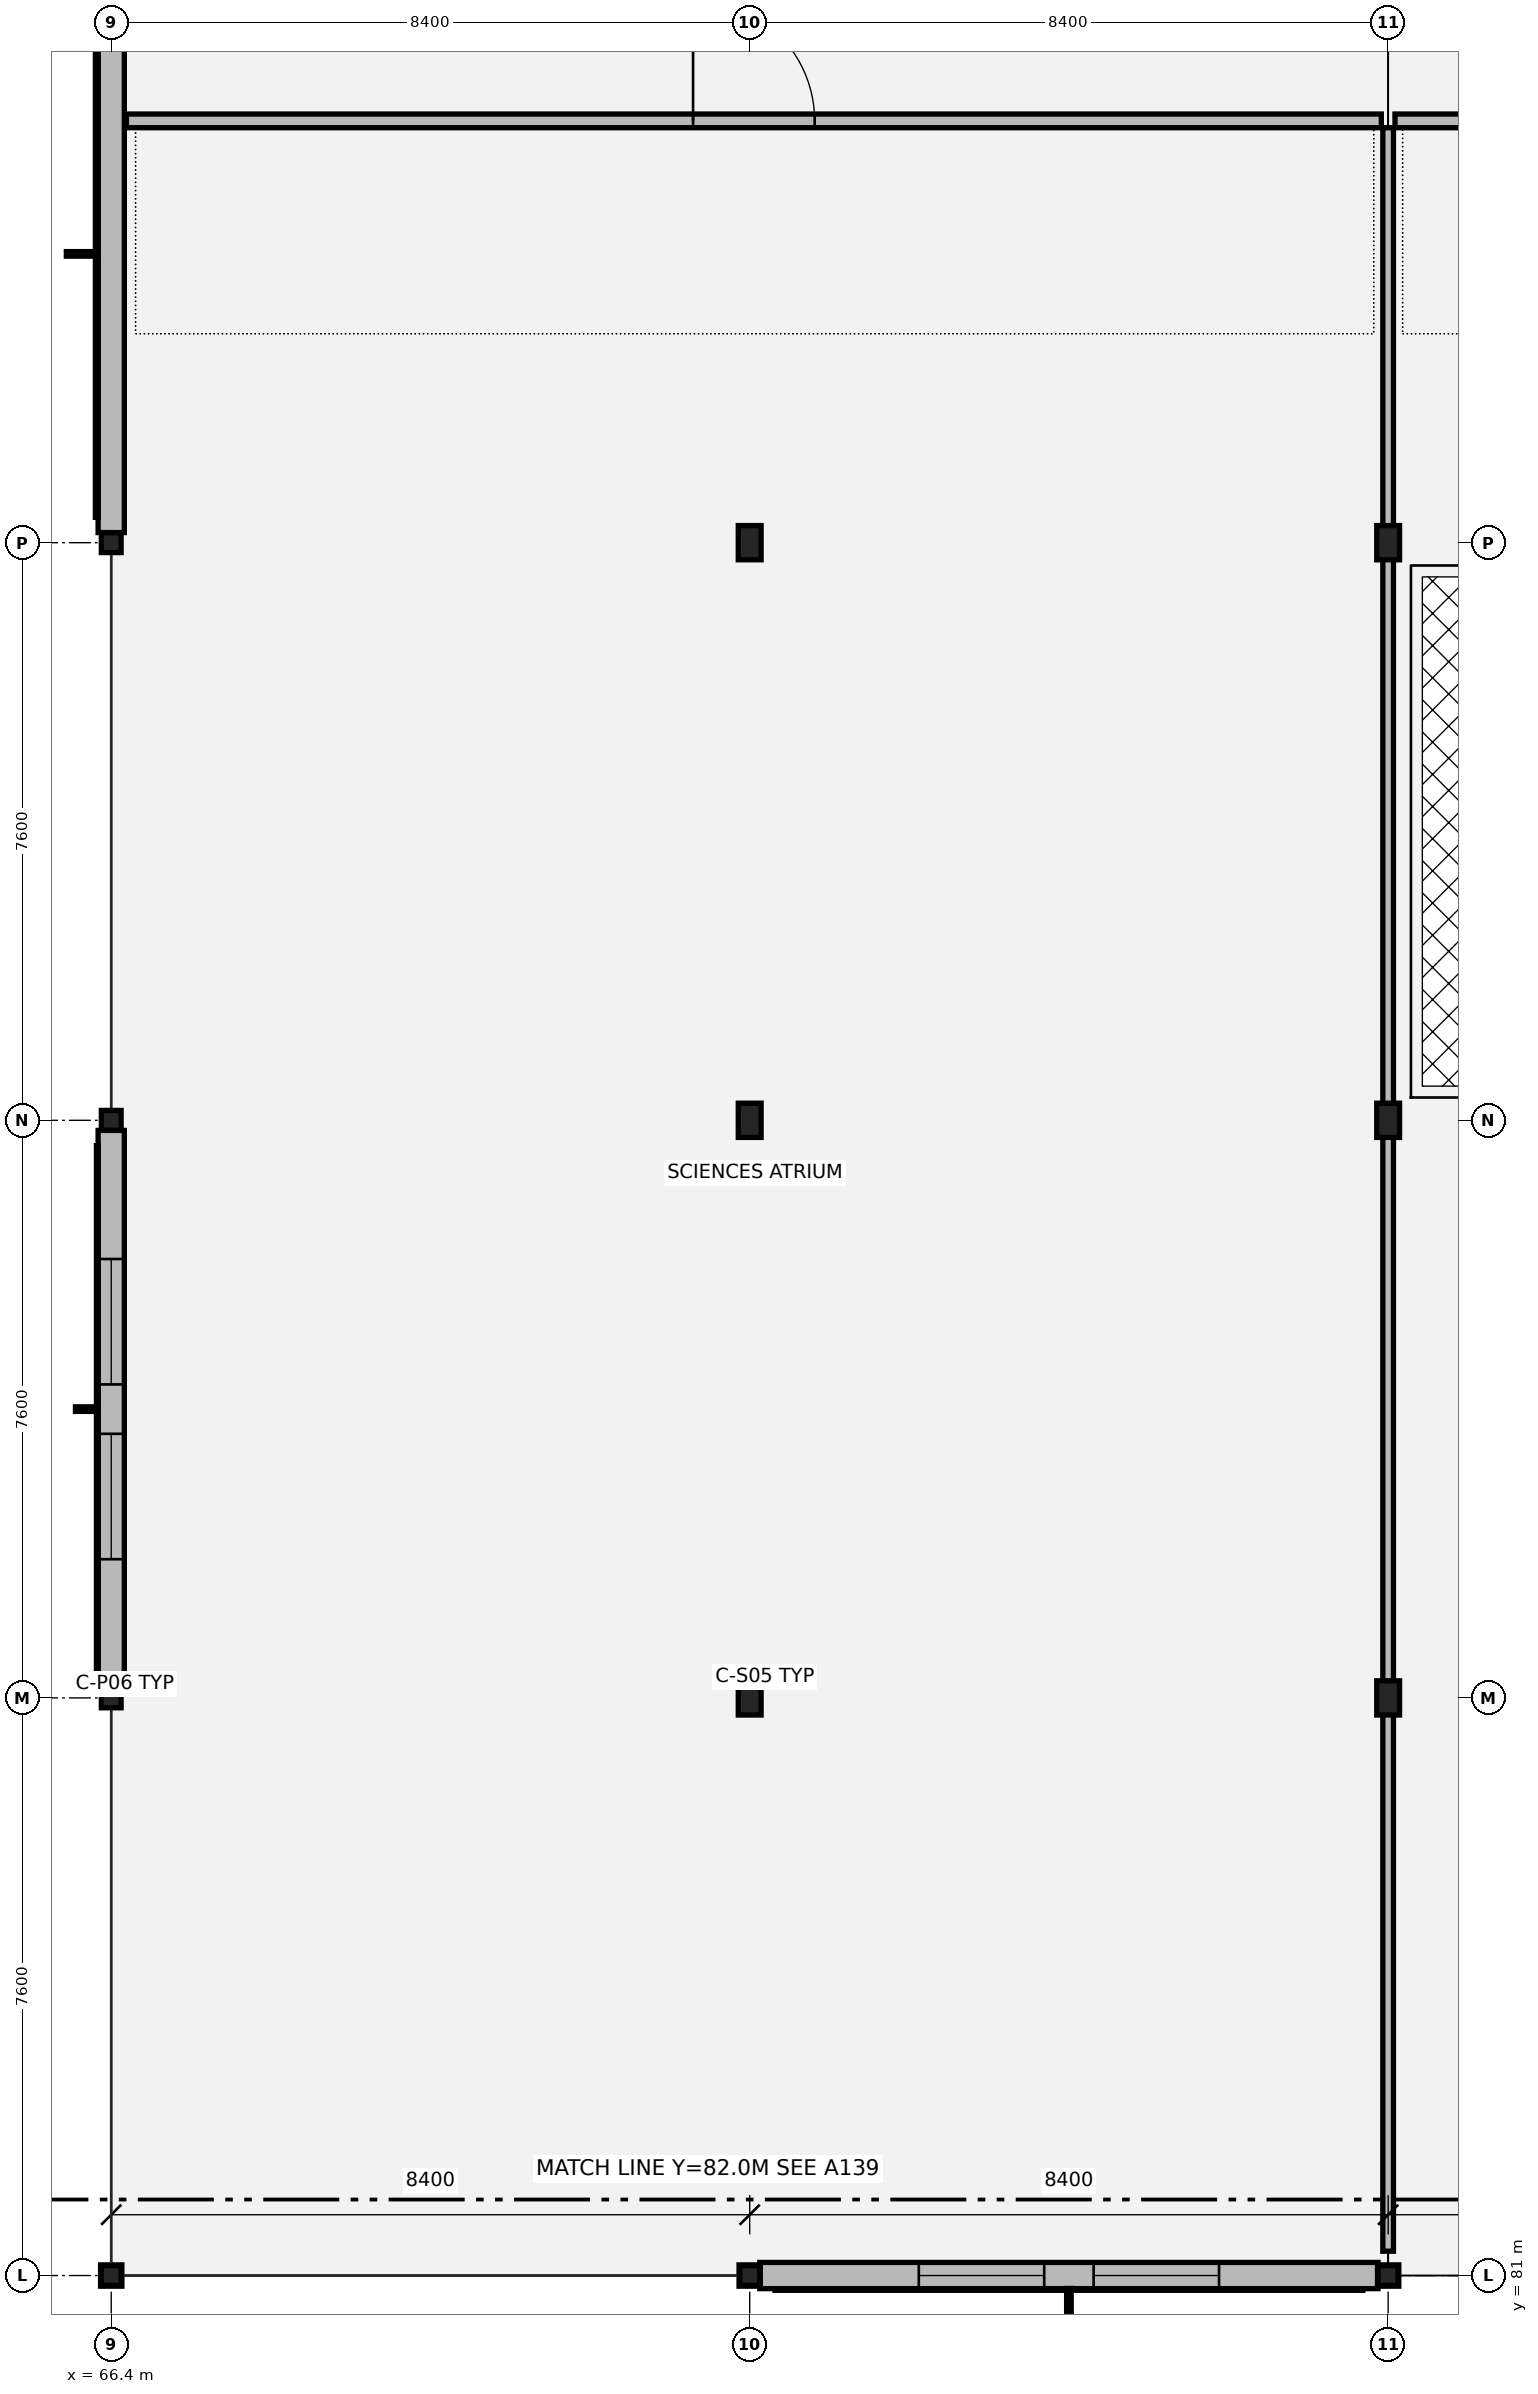
"""IFC4 building model, lengths in metres.
Left out: names, types, materials, properties, quantities, classifications, styles, units other than length and angle.
Written with IfcOpenShell. Run it as: python <this file> out.ifc"""

import sys

from ifc_helpers import new_model, si_unit, direction, frame, frame_2d, origin, origin_2d, place, context, subcontext, project, spatial, rectangle, hollow_rectangle, i_section, extrude, element, fill, save


model = new_model("IFC4")
c1 = context("Model", 3, precision=1e-05, world=origin(), true_north=direction((0.0, 1.0)))
c2 = subcontext(c1, "Body", "Model", "MODEL_VIEW")
j1 = project(units=[si_unit("LENGTHUNIT", "METRE"), si_unit("PLANEANGLEUNIT", "RADIAN")], contexts=[c1])
p1 = place(None, origin())
s1 = spatial("IfcSite", under=j1, at=p1, CompositionType="ELEMENT")
p2 = place(p1, origin())
s2 = spatial("IfcBuilding", under=s1, at=p2, CompositionType="ELEMENT")
p3 = place(p2, frame((0.0, 0.0, 9.18)))
s3 = spatial("IfcBuildingStorey", under=s2, at=p3, CompositionType="ELEMENT", Elevation=9.18)
p4 = place(p3, frame((66.4, 81.0, 0.0), z_axis=(0.0, 0.0, 1.0), x_axis=(1.0, 0.0, 0.0)))
e1 = element("IfcColumn", 1, at=p4, inside=s3, PredefinedType="COLUMN", context=c2, shape_type="SweptSolid", body=[
    extrude(hollow_rectangle(XDim=0.26, YDim=0.26, WallThickness=0.012, at=origin_2d()), origin(), (0.0, 0.0, 1.0), 3.875),
])
for number, where, z_axis, x_axis in (
    (2, (66.4, 88.6, 0.0), (0.0, 0.0, 1.0), (1.0, 0.0, 0.0)),
    (3, (66.4, 96.2, 0.0), (0.0, 0.0, 1.0), (1.0, 0.0, 0.0)),
    (4, (66.4, 103.8, 0.0), (0.0, 0.0, 1.0), (1.0, 0.0, 0.0)),
):
    element("IfcColumn", number, at=place(p3, frame(where, z_axis=z_axis, x_axis=x_axis)), inside=s3, PredefinedType="COLUMN", context=c2, shape_type="SweptSolid", body=[
        extrude(hollow_rectangle(XDim=0.26, YDim=0.26, WallThickness=0.012, at=origin_2d()), origin(), (0.0, 0.0, 1.0), 4.055),
    ])
p5 = place(p3, frame((74.8, 81.0, 0.0), z_axis=(0.0, 0.0, 1.0), x_axis=(1.0, 0.0, 0.0)))
e5 = element("IfcColumn", 5, at=p5, inside=s3, PredefinedType="COLUMN", context=c2, shape_type="SweptSolid", body=[
    extrude(hollow_rectangle(XDim=0.26, YDim=0.26, WallThickness=0.012, at=origin_2d()), origin(), (0.0, 0.0, 1.0), 3.875),
])
for number, where, z_axis, x_axis in (
    (6, (74.8, 88.6, 0.0), (0.0, 0.0, 1.0), (1.0, 0.0, 0.0)),
    (7, (74.8, 96.2, 0.0), (0.0, 0.0, 1.0), (1.0, 0.0, 0.0)),
    (8, (74.8, 103.8, 0.0), (0.0, 0.0, 1.0), (1.0, 0.0, 0.0)),
):
    element("IfcColumn", number, at=place(p3, frame(where, z_axis=z_axis, x_axis=x_axis)), inside=s3, PredefinedType="COLUMN", context=c2, shape_type="SweptSolid", body=[
        extrude(i_section(OverallWidth=0.3, OverallDepth=0.45, WebThickness=0.014, FlangeThickness=0.026, at=origin_2d()), origin(), (0.0, 0.0, 1.0), 4.055),
    ])
p6 = place(p3, frame((83.2, 81.0, 0.0), z_axis=(0.0, 0.0, 1.0), x_axis=(1.0, 0.0, 0.0)))
e9 = element("IfcColumn", 9, at=p6, inside=s3, PredefinedType="COLUMN", context=c2, shape_type="SweptSolid", body=[
    extrude(hollow_rectangle(XDim=0.26, YDim=0.26, WallThickness=0.012, at=origin_2d()), origin(), (0.0, 0.0, 1.0), 3.875),
])
for number, where, z_axis, x_axis in (
    (10, (83.2, 88.6, 0.0), (0.0, 0.0, 1.0), (1.0, 0.0, 0.0)),
    (11, (83.2, 96.2, 0.0), (0.0, 0.0, 1.0), (1.0, 0.0, 0.0)),
    (12, (83.2, 103.8, 0.0), (0.0, 0.0, 1.0), (1.0, 0.0, 0.0)),
):
    element("IfcColumn", number, at=place(p3, frame(where, z_axis=z_axis, x_axis=x_axis)), inside=s3, PredefinedType="COLUMN", context=c2, shape_type="SweptSolid", body=[
        extrude(i_section(OverallWidth=0.3, OverallDepth=0.45, WebThickness=0.014, FlangeThickness=0.026, at=origin_2d()), origin(), (0.0, 0.0, 1.0), 4.055),
    ])
p7 = place(p3, frame((74.933, 81.0, 0.0), z_axis=(0.0, 0.0, 1.0), x_axis=(1.0, 0.0, 0.0)))
e13 = element("IfcWall", 13, at=p7, inside=s3, PredefinedType="SOLIDWALL", context=c2, shape_type="SweptSolid", body=[
    extrude(rectangle(XDim=8.134, YDim=0.345, at=frame_2d((4.067, 0.0))), origin(), (0.0, 0.0, 1.0), 3.48),
])
p8 = place(p7, frame((2.092, 0.0, 0.8)))
e14 = element("IfcOpeningElement", 14, at=p8, cuts=e13, PredefinedType="OPENING", context=c2, shape_type="SweptSolid", body=[
    extrude(rectangle(XDim=1.65, YDim=2.25, at=frame_2d((0.825, 1.125))), frame((0.0, 0.182, 0.0), z_axis=(0.0, -1.0, 0.0), x_axis=(1.0, 0.0, 0.0)), (0.0, 0.0, 1.0), 0.365),
])
p9 = place(p7, frame((4.392, 0.0, 0.8)))
e15 = element("IfcOpeningElement", 15, at=p9, cuts=e13, PredefinedType="OPENING", context=c2, shape_type="SweptSolid", body=[
    extrude(rectangle(XDim=1.65, YDim=2.25, at=frame_2d((0.825, 1.125))), frame((0.0, 0.182, 0.0), z_axis=(0.0, -1.0, 0.0), x_axis=(1.0, 0.0, 0.0)), (0.0, 0.0, 1.0), 0.365),
])
p10 = place(p3, frame((66.4, 111.267, 0.0), z_axis=(0.0, 0.0, 1.0), x_axis=(0.0, -1.0, 0.0)))
e16 = element("IfcWall", 16, at=p10, inside=s3, PredefinedType="SOLIDWALL", context=c2, shape_type="SweptSolid", body=[
    extrude(rectangle(XDim=7.334, YDim=0.345, at=frame_2d((3.667, 0.0))), origin(), (0.0, 0.0, 1.0), 3.48),
])
p11 = place(p3, frame((66.4, 96.067, 0.0), z_axis=(0.0, 0.0, 1.0), x_axis=(0.0, -1.0, 0.0)))
e17 = element("IfcWall", 17, at=p11, inside=s3, PredefinedType="SOLIDWALL", context=c2, shape_type="SweptSolid", body=[
    extrude(rectangle(XDim=7.334, YDim=0.345, at=frame_2d((3.667, 0.0))), origin(), (0.0, 0.0, 1.0), 3.48),
])
p12 = place(p11, frame((1.692, 0.0, 0.8)))
e18 = element("IfcOpeningElement", 18, at=p12, cuts=e17, PredefinedType="OPENING", context=c2, shape_type="SweptSolid", body=[
    extrude(rectangle(XDim=1.65, YDim=2.25, at=frame_2d((0.825, 1.125))), frame((0.0, 0.182, 0.0), z_axis=(0.0, -1.0, 0.0), x_axis=(1.0, 0.0, 0.0)), (0.0, 0.0, 1.0), 0.365),
])
p13 = place(p11, frame((3.992, 0.0, 0.8)))
e19 = element("IfcOpeningElement", 19, at=p13, cuts=e17, PredefinedType="OPENING", context=c2, shape_type="SweptSolid", body=[
    extrude(rectangle(XDim=1.65, YDim=2.25, at=frame_2d((0.825, 1.125))), frame((0.0, 0.182, 0.0), z_axis=(0.0, -1.0, 0.0), x_axis=(1.0, 0.0, 0.0)), (0.0, 0.0, 1.0), 0.365),
])
p14 = place(p3, frame((66.6, 109.35, 0.0), z_axis=(0.0, 0.0, 1.0), x_axis=(1.0, 0.0, 0.0)))
e20 = element("IfcWall", 20, at=p14, inside=s3, PredefinedType="PARTITIONING", context=c2, shape_type="SweptSolid", body=[
    extrude(rectangle(XDim=16.51, YDim=0.18, at=frame_2d((8.255, 0.0))), origin(), (0.0, 0.0, 1.0), 3.18),
])
p15 = place(p14, frame((7.455, 0.0, 0.0)))
e21 = element("IfcOpeningElement", 21, at=p15, cuts=e20, PredefinedType="OPENING", context=c2, shape_type="SweptSolid", body=[
    extrude(rectangle(XDim=1.6, YDim=2.25, at=frame_2d((0.8, 1.125))), frame((0.0, 0.1, 0.0), z_axis=(0.0, -1.0, 0.0), x_axis=(1.0, 0.0, 0.0)), (0.0, 0.0, 1.0), 0.2),
])
p16 = place(p3, frame((83.29, 109.35, 0.0), z_axis=(0.0, 0.0, 1.0), x_axis=(1.0, 0.0, 0.0)))
e22 = element("IfcWall", 22, at=p16, inside=s3, PredefinedType="PARTITIONING", context=c2, shape_type="SweptSolid", body=[
    extrude(rectangle(XDim=8.22, YDim=0.18, at=frame_2d((4.11, 0.0))), origin(), (0.0, 0.0, 1.0), 3.18),
])
p17 = place(p16, frame((3.43, 0.0, 0.0)))
e23 = element("IfcOpeningElement", 23, at=p17, cuts=e22, PredefinedType="OPENING", context=c2, shape_type="SweptSolid", body=[
    extrude(rectangle(XDim=1.36, YDim=2.2, at=frame_2d((0.68, 1.1))), frame((0.0, 0.1, 0.0), z_axis=(0.0, -1.0, 0.0), x_axis=(1.0, 0.0, 0.0)), (0.0, 0.0, 1.0), 0.2),
])
p18 = place(p3, frame((83.2, 81.32, 0.0), z_axis=(0.0, 0.0, 1.0), x_axis=(0.0, 1.0, 0.0)))
e24 = element("IfcWall", 24, at=p18, inside=s3, PredefinedType="PARTITIONING", context=c2, shape_type="SweptSolid", body=[
    extrude(rectangle(XDim=27.94, YDim=0.14, at=frame_2d((13.97, 0.0))), origin(), (0.0, 0.0, 1.0), 3.18),
])
p19 = place(p8, origin())
e25 = element("IfcWindow", 25, at=p19, inside=s3, PartitioningType="SINGLE_PANEL", PredefinedType="WINDOW", context=c2, shape_type="SweptSolid", body=[
    extrude(rectangle(XDim=1.65, YDim=2.25, at=frame_2d((0.825, 1.125))), frame((0.0, 0.03, 0.0), z_axis=(0.0, -1.0, 0.0), x_axis=(1.0, 0.0, 0.0)), (0.0, 0.0, 1.0), 0.06),
])
fill(e14, e25)
p20 = place(p9, origin())
e26 = element("IfcWindow", 26, at=p20, inside=s3, PartitioningType="SINGLE_PANEL", PredefinedType="WINDOW", context=c2, shape_type="SweptSolid", body=[
    extrude(rectangle(XDim=1.65, YDim=2.25, at=frame_2d((0.825, 1.125))), frame((0.0, 0.03, 0.0), z_axis=(0.0, -1.0, 0.0), x_axis=(1.0, 0.0, 0.0)), (0.0, 0.0, 1.0), 0.06),
])
fill(e15, e26)
p21 = place(p12, origin())
e27 = element("IfcWindow", 27, at=p21, inside=s3, PartitioningType="SINGLE_PANEL", PredefinedType="WINDOW", context=c2, shape_type="SweptSolid", body=[
    extrude(rectangle(XDim=1.65, YDim=2.25, at=frame_2d((0.825, 1.125))), frame((0.0, 0.03, 0.0), z_axis=(0.0, -1.0, 0.0), x_axis=(1.0, 0.0, 0.0)), (0.0, 0.0, 1.0), 0.06),
])
fill(e18, e27)
p22 = place(p13, origin())
e28 = element("IfcWindow", 28, at=p22, inside=s3, PartitioningType="SINGLE_PANEL", PredefinedType="WINDOW", context=c2, shape_type="SweptSolid", body=[
    extrude(rectangle(XDim=1.65, YDim=2.25, at=frame_2d((0.825, 1.125))), frame((0.0, 0.03, 0.0), z_axis=(0.0, -1.0, 0.0), x_axis=(1.0, 0.0, 0.0)), (0.0, 0.0, 1.0), 0.06),
])
fill(e19, e28)
p23 = place(p15, origin())
e29 = element("IfcDoor", 29, at=p23, inside=s3, OperationType="DOUBLE_DOOR_SINGLE_SWING", PredefinedType="DOOR", context=c2, shape_type="SweptSolid", body=[
    extrude(rectangle(XDim=1.6, YDim=2.25, at=frame_2d((0.8, 1.125))), frame((0.0, 0.025, 0.0), z_axis=(0.0, -1.0, 0.0), x_axis=(1.0, 0.0, 0.0)), (0.0, 0.0, 1.0), 0.05),
])
fill(e21, e29)
save(model, sys.argv[1])
